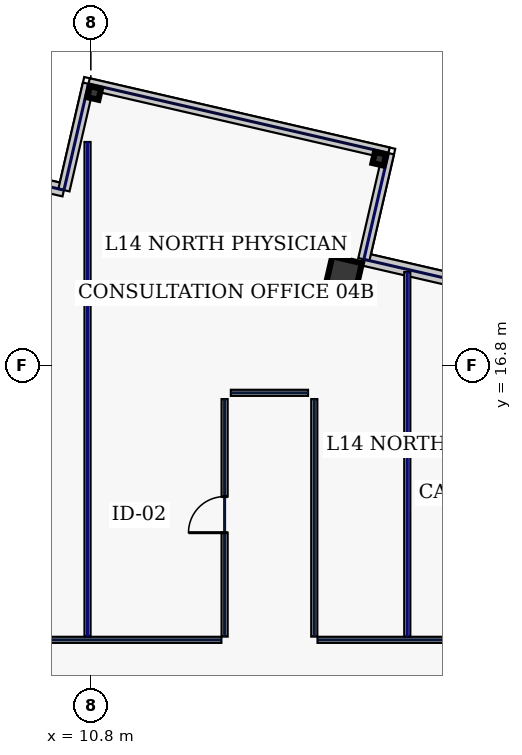
"""IFC4 building model, lengths in metres.
Left out: names, types, materials, properties, quantities, classifications, styles, units other than length and angle.
Written with IfcOpenShell. Run it as: python <this file> out.ifc"""

import sys

from ifc_helpers import new_model, si_unit, direction, frame, frame_2d, origin, origin_2d, place, context, subcontext, project, spatial, rectangle, hollow_rectangle, extrude, element, fill, save


model = new_model("IFC4")
c1 = context("Model", 3, precision=1e-05, world=origin(), true_north=direction((0.0, 1.0)))
c2 = subcontext(c1, "Body", "Model", "MODEL_VIEW")
j1 = project(units=[si_unit("LENGTHUNIT", "METRE"), si_unit("PLANEANGLEUNIT", "RADIAN")], contexts=[c1])
p1 = place(None, origin())
s1 = spatial("IfcSite", under=j1, at=p1, CompositionType="ELEMENT")
p2 = place(p1, origin())
s2 = spatial("IfcBuilding", under=s1, at=p2, CompositionType="ELEMENT")
p3 = place(p2, frame((0.0, 0.0, 67.4)))
s3 = spatial("IfcBuildingStorey", under=s2, at=p3, CompositionType="ELEMENT", Elevation=67.4)
p4 = place(p3, frame((17.454, 19.192, 0.0), z_axis=(0.0, 0.0, 1.0), x_axis=(0.974370064785, -0.224951054344, 0.0)))
e1 = element("IfcColumn", 1, at=p4, inside=s3, PredefinedType="COLUMN", context=c2, shape_type="SweptSolid", body=[
    extrude(hollow_rectangle(XDim=0.8, YDim=0.8, WallThickness=0.036, at=origin_2d()), origin(), (0.0, 0.0, 1.0), 3.74),
])
for number, where, z_axis, x_axis in (
    (2, (10.888, 23.971, 0.0), (0.0, 0.0, 1.0), (0.974, -0.225, 0.0)),
    (3, (18.391, 22.239, 0.0), (0.0, 0.0, 1.0), (0.974, -0.225, 0.0)),
):
    element("IfcColumn", number, at=place(p3, frame(where, z_axis=z_axis, x_axis=x_axis)), inside=s3, PredefinedType="COLUMN", context=c2, shape_type="SweptSolid", body=[
        extrude(hollow_rectangle(XDim=0.3, YDim=0.3, WallThickness=0.016, at=origin_2d()), origin(), (0.0, 0.0, 1.0), 3.74),
    ])
p5 = place(p3, frame((37.229, 15.15, 0.0), z_axis=(0.0, 0.0, 1.0), x_axis=(-0.974368689865, 0.224957009695, 0.0)))
e4 = element("IfcWall", 4, at=p5, inside=s3, PredefinedType="STANDARD", context=c2, shape_type="SweptSolid", body=[
    extrude(rectangle(XDim=19.75, YDim=0.34, at=frame_2d((9.875, 0.0))), origin(), (0.0, 0.0, 1.0), 3.74),
])
p6 = place(p5, frame((16.395, 0.0, 0.77)))
e5 = element("IfcOpeningElement", 5, at=p6, cuts=e4, PredefinedType="OPENING", context=c2, shape_type="SweptSolid", body=[
    extrude(rectangle(XDim=0.85, YDim=1.85, at=frame_2d((0.425, 0.925))), frame((0.0, 0.18, 0.0), z_axis=(0.0, -1.0, 0.0), x_axis=(1.0, 0.0, 0.0)), (0.0, 0.0, 1.0), 0.36),
])
p7 = place(p5, frame((11.911, 0.0, 0.77)))
e6 = element("IfcOpeningElement", 6, at=p7, cuts=e4, PredefinedType="OPENING", context=c2, shape_type="SweptSolid", body=[
    extrude(rectangle(XDim=0.85, YDim=1.85, at=frame_2d((0.425, 0.925))), frame((0.0, 0.18, 0.0), z_axis=(0.0, -1.0, 0.0), x_axis=(1.0, 0.0, 0.0)), (0.0, 0.0, 1.0), 0.36),
])
p8 = place(p5, frame((2.162, 0.0, 0.77)))
e7 = element("IfcOpeningElement", 7, at=p8, cuts=e4, PredefinedType="OPENING", context=c2, shape_type="SweptSolid", body=[
    extrude(rectangle(XDim=2.3, YDim=2.1, at=frame_2d((1.15, 1.05))), frame((0.0, 0.18, 0.0), z_axis=(0.0, -1.0, 0.0), x_axis=(1.0, 0.0, 0.0)), (0.0, 0.0, 1.0), 0.36),
])
p9 = place(p3, frame((10.092, 21.415, 0.0), z_axis=(0.0, 0.0, 1.0), x_axis=(-0.97436816851, 0.224959267855, 0.0)))
e8 = element("IfcWall", 8, at=p9, inside=s3, PredefinedType="STANDARD", context=c2, shape_type="SweptSolid", body=[
    extrude(rectangle(XDim=14.298, YDim=0.34, at=frame_2d((7.149, 0.0))), origin(), (0.0, 0.0, 1.0), 3.74),
])
p10 = place(p9, frame((9.492, 0.0, 0.77)))
e9 = element("IfcOpeningElement", 9, at=p10, cuts=e8, PredefinedType="OPENING", context=c2, shape_type="SweptSolid", body=[
    extrude(rectangle(XDim=0.85, YDim=1.85, at=frame_2d((0.425, 0.925))), frame((0.0, 0.18, 0.0), z_axis=(0.0, -1.0, 0.0), x_axis=(1.0, 0.0, 0.0)), (0.0, 0.0, 1.0), 0.36),
])
p11 = place(p9, frame((3.558, 0.0, 0.77)))
e10 = element("IfcOpeningElement", 10, at=p11, cuts=e8, PredefinedType="OPENING", context=c2, shape_type="SweptSolid", body=[
    extrude(rectangle(XDim=2.3, YDim=2.1, at=frame_2d((1.15, 1.05))), frame((0.0, 0.18, 0.0), z_axis=(0.0, -1.0, 0.0), x_axis=(1.0, 0.0, 0.0)), (0.0, 0.0, 1.0), 0.36),
])
p12 = place(p3, frame((10.092, 21.415, 0.0), z_axis=(0.0, 0.0, 1.0), x_axis=(0.225002397841, 0.97435820978, 0.0)))
e11 = element("IfcWall", 11, at=p12, inside=s3, PredefinedType="STANDARD", context=c2, shape_type="SweptSolid", body=[
    extrude(rectangle(XDim=2.87, YDim=0.3, at=frame_2d((1.435, 0.0))), origin(), (0.0, 0.0, 1.0), 1.535),
])
p13 = place(p3, frame((17.985, 19.593, 0.0), z_axis=(0.0, 0.0, 1.0), x_axis=(0.224921635065, 0.974376856293, 0.0)))
e12 = element("IfcWall", 12, at=p13, inside=s3, PredefinedType="STANDARD", context=c2, shape_type="SweptSolid", body=[
    extrude(rectangle(XDim=2.87, YDim=0.3, at=frame_2d((1.435, 0.0))), origin(), (0.0, 0.0, 1.0), 3.74),
])
p14 = place(p3, frame((10.738, 24.211, 0.0), z_axis=(0.0, 0.0, 1.0), x_axis=(0.974371888243, -0.224943155936, 0.0)))
e13 = element("IfcWall", 13, at=p14, inside=s3, PredefinedType="STANDARD", context=c2, shape_type="SweptSolid", body=[
    extrude(rectangle(XDim=8.1, YDim=0.3, at=frame_2d((4.05, 0.0))), origin(), (0.0, 0.0, 1.0), 2.135),
])
p15 = place(p3, frame((-29.415, 9.58, 0.0), z_axis=(0.0, 0.0, 1.0), x_axis=(1.0, 0.0, 0.0)))
e14 = element("IfcWall", 14, at=p15, inside=s3, PredefinedType="PARTITIONING", context=c2, shape_type="SweptSolid", body=[
    extrude(rectangle(XDim=43.65, YDim=0.16, at=frame_2d((21.825, 0.0))), origin(), (0.0, 0.0, 1.0), 3.74),
])
p16 = place(p15, frame((2.469, 0.0, 0.0)))
e15 = element("IfcOpeningElement", 15, at=p16, cuts=e14, PredefinedType="OPENING", context=c2, shape_type="SweptSolid", body=[
    extrude(rectangle(XDim=1.05, YDim=2.2, at=frame_2d((0.525, 1.1))), frame((0.0, 0.09, 0.0), z_axis=(0.0, -1.0, 0.0), x_axis=(1.0, 0.0, 0.0)), (0.0, 0.0, 1.0), 0.18),
])
p17 = place(p15, frame((8.2, 0.0, 0.0)))
e16 = element("IfcOpeningElement", 16, at=p17, cuts=e14, PredefinedType="OPENING", context=c2, shape_type="SweptSolid", body=[
    extrude(rectangle(XDim=0.95, YDim=2.2, at=frame_2d((0.475, 1.1))), frame((0.0, 0.09, 0.0), z_axis=(0.0, -1.0, 0.0), x_axis=(1.0, 0.0, 0.0)), (0.0, 0.0, 1.0), 0.18),
])
p18 = place(p15, frame((14.1, 0.0, 0.0)))
e17 = element("IfcOpeningElement", 17, at=p18, cuts=e14, PredefinedType="OPENING", context=c2, shape_type="SweptSolid", body=[
    extrude(rectangle(XDim=0.95, YDim=2.2, at=frame_2d((0.475, 1.1))), frame((0.0, 0.09, 0.0), z_axis=(0.0, -1.0, 0.0), x_axis=(1.0, 0.0, 0.0)), (0.0, 0.0, 1.0), 0.18),
])
p19 = place(p15, frame((20.275, 0.0, 0.0)))
e18 = element("IfcOpeningElement", 18, at=p19, cuts=e14, PredefinedType="OPENING", context=c2, shape_type="SweptSolid", body=[
    extrude(rectangle(XDim=1.3, YDim=2.2, at=frame_2d((0.65, 1.1))), frame((0.0, 0.09, 0.0), z_axis=(0.0, -1.0, 0.0), x_axis=(1.0, 0.0, 0.0)), (0.0, 0.0, 1.0), 0.18),
])
p20 = place(p15, frame((27.075, 0.0, 0.0)))
e19 = element("IfcOpeningElement", 19, at=p20, cuts=e14, PredefinedType="OPENING", context=c2, shape_type="SweptSolid", body=[
    extrude(rectangle(XDim=1.3, YDim=2.2, at=frame_2d((0.65, 1.1))), frame((0.0, 0.09, 0.0), z_axis=(0.0, -1.0, 0.0), x_axis=(1.0, 0.0, 0.0)), (0.0, 0.0, 1.0), 0.18),
])
p21 = place(p15, frame((34.906, 0.0, 0.0)))
e20 = element("IfcOpeningElement", 20, at=p21, cuts=e14, PredefinedType="OPENING", context=c2, shape_type="SweptSolid", body=[
    extrude(rectangle(XDim=1.45, YDim=2.2, at=frame_2d((0.725, 1.1))), frame((0.0, 0.09, 0.0), z_axis=(0.0, -1.0, 0.0), x_axis=(1.0, 0.0, 0.0)), (0.0, 0.0, 1.0), 0.18),
])
p22 = place(p3, frame((14.32, 9.665, 0.0), z_axis=(0.0, 0.0, 1.0), x_axis=(0.0, 1.0, 0.0)))
e21 = element("IfcWall", 21, at=p22, inside=s3, PredefinedType="PARTITIONING", context=c2, shape_type="SweptSolid", body=[
    extrude(rectangle(XDim=6.25, YDim=0.16, at=frame_2d((3.125, 0.0))), origin(), (0.0, 0.0, 1.0), 3.74),
])
p23 = place(p22, frame((2.735, 0.0, 0.0)))
e22 = element("IfcOpeningElement", 22, at=p23, cuts=e21, PredefinedType="OPENING", context=c2, shape_type="SweptSolid", body=[
    extrude(rectangle(XDim=0.95, YDim=2.2, at=frame_2d((0.475, 1.1))), frame((0.0, 0.09, 0.0), z_axis=(0.0, -1.0, 0.0), x_axis=(1.0, 0.0, 0.0)), (0.0, 0.0, 1.0), 0.18),
])
p24 = place(p3, frame((14.485, 16.08, 0.0), z_axis=(0.0, 0.0, 1.0), x_axis=(1.0, 0.0, 0.0)))
e23 = element("IfcWall", 23, at=p24, inside=s3, PredefinedType="PARTITIONING", context=c2, shape_type="SweptSolid", body=[
    extrude(rectangle(XDim=2.03, YDim=0.16, at=frame_2d((1.015, 0.0))), origin(), (0.0, 0.0, 1.0), 3.74),
])
p25 = place(p3, frame((16.68, 15.915, 0.0), z_axis=(0.0, 0.0, 1.0), x_axis=(0.0, -1.0, 0.0)))
e24 = element("IfcWall", 24, at=p25, inside=s3, PredefinedType="PARTITIONING", context=c2, shape_type="SweptSolid", body=[
    extrude(rectangle(XDim=6.25, YDim=0.16, at=frame_2d((3.125, 0.0))), origin(), (0.0, 0.0, 1.0), 3.74),
])
p26 = place(p3, frame((16.765, 9.58, 0.0), z_axis=(0.0, 0.0, 1.0), x_axis=(1.0, 0.0, 0.0)))
e25 = element("IfcWall", 25, at=p26, inside=s3, PredefinedType="PARTITIONING", context=c2, shape_type="SweptSolid", body=[
    extrude(rectangle(XDim=12.65, YDim=0.16, at=frame_2d((6.325, 0.0))), origin(), (0.0, 0.0, 1.0), 3.74),
])
p27 = place(p26, frame((5.438, 0.0, 0.0)))
e26 = element("IfcOpeningElement", 26, at=p27, cuts=e25, PredefinedType="OPENING", context=c2, shape_type="SweptSolid", body=[
    extrude(rectangle(XDim=0.95, YDim=2.2, at=frame_2d((0.475, 1.1))), frame((0.0, 0.09, 0.0), z_axis=(0.0, -1.0, 0.0), x_axis=(1.0, 0.0, 0.0)), (0.0, 0.0, 1.0), 0.18),
])
p28 = place(p26, frame((9.176, 0.0, 0.0)))
e27 = element("IfcOpeningElement", 27, at=p28, cuts=e25, PredefinedType="OPENING", context=c2, shape_type="SweptSolid", body=[
    extrude(rectangle(XDim=1.3, YDim=2.2, at=frame_2d((0.65, 1.1))), frame((0.0, 0.09, 0.0), z_axis=(0.0, -1.0, 0.0), x_axis=(1.0, 0.0, 0.0)), (0.0, 0.0, 1.0), 0.18),
])
p29 = place(p3, frame((19.127, 9.665, 0.0), z_axis=(0.0, 0.0, 1.0), x_axis=(0.0, 1.0, 0.0)))
e28 = element("IfcWall", 28, at=p29, inside=s3, PredefinedType="PARTITIONING", context=c2, shape_type="SweptSolid", body=[
    extrude(rectangle(XDim=9.592, YDim=0.16, at=frame_2d((4.796, 0.0))), origin(), (0.0, 0.0, 1.0), 1.535),
])
p30 = place(p3, frame((10.713, 9.665, 0.0), z_axis=(0.0, 0.0, 1.0), x_axis=(0.0, 1.0, 0.0)))
e29 = element("IfcWall", 29, at=p30, inside=s3, PredefinedType="PARTITIONING", context=c2, shape_type="SweptSolid", body=[
    extrude(rectangle(XDim=13.015, YDim=0.16, at=frame_2d((6.508, 0.0))), origin(), (0.0, 0.0, 1.0), 1.535),
])
p31 = place(p23, origin())
e30 = element("IfcDoor", 30, at=p31, inside=s3, OperationType="SINGLE_SWING_LEFT", PredefinedType="DOOR", context=c2, shape_type="SweptSolid", body=[
    extrude(rectangle(XDim=0.95, YDim=2.2, at=frame_2d((0.475, 1.1))), frame((0.0, 0.025, 0.0), z_axis=(0.0, -1.0, 0.0), x_axis=(1.0, 0.0, 0.0)), (0.0, 0.0, 1.0), 0.05),
])
fill(e22, e30)
save(model, sys.argv[1])
